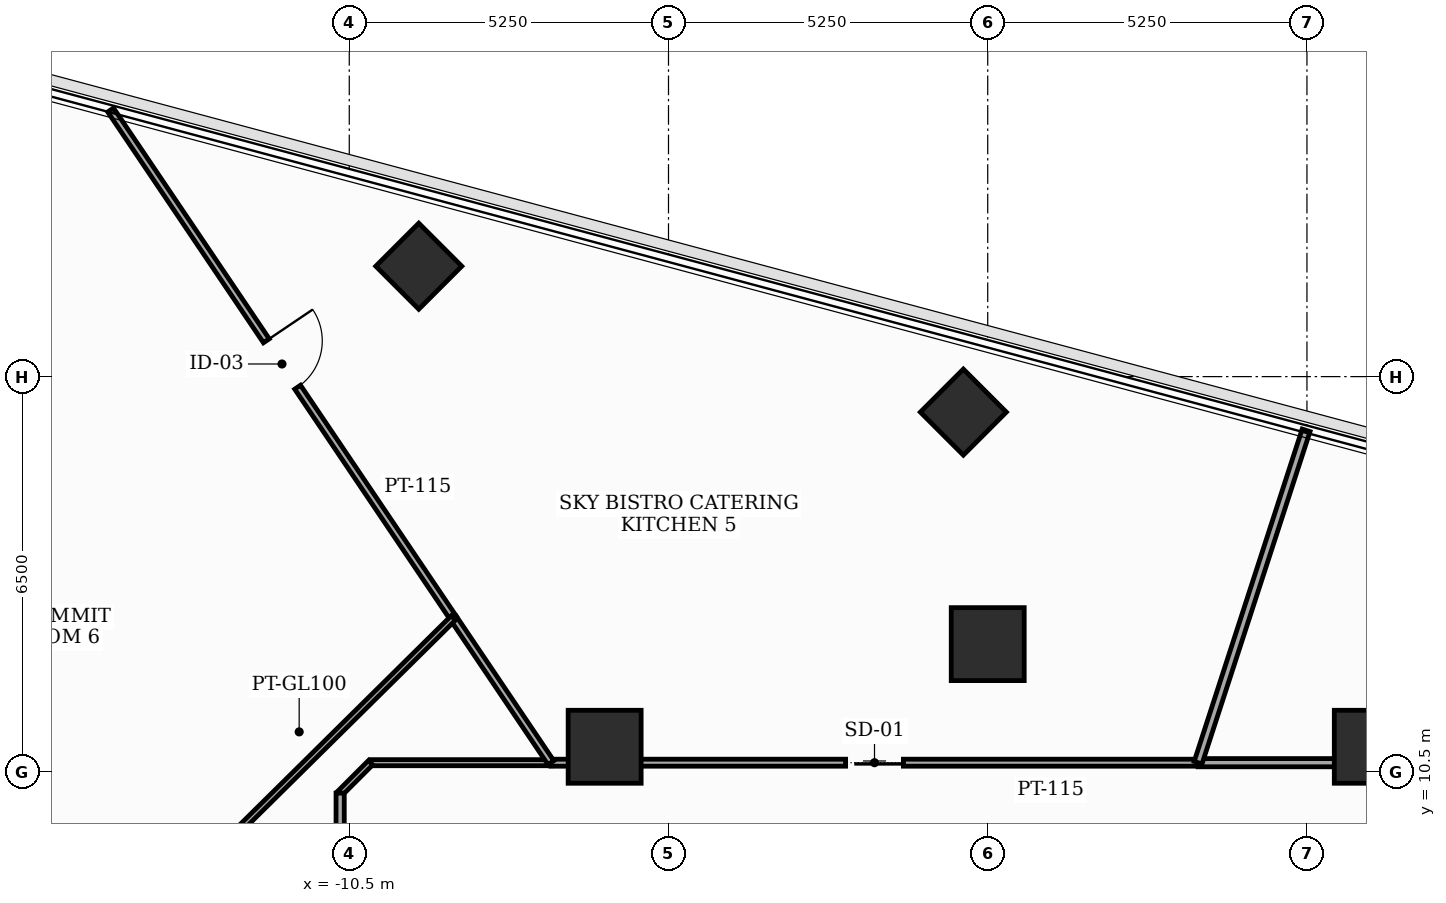
"""IFC4 building model, lengths in metres.
Left out: names, types, materials, properties, quantities, classifications, styles, units other than length and angle.
Written with IfcOpenShell. Run it as: python <this file> out.ifc"""

import sys

from ifc_helpers import new_model, si_unit, direction, frame, frame_2d, origin, origin_2d, place, context, subcontext, project, spatial, rectangle, extrude, element, fill, save


model = new_model("IFC4")
c1 = context("Model", 3, precision=1e-05, world=origin(), true_north=direction((0.0, 1.0)))
c2 = subcontext(c1, "Body", "Model", "MODEL_VIEW")
j1 = project(units=[si_unit("LENGTHUNIT", "METRE"), si_unit("PLANEANGLEUNIT", "RADIAN")], contexts=[c1])
p1 = place(None, origin())
s1 = spatial("IfcSite", under=j1, at=p1, CompositionType="ELEMENT")
p2 = place(p1, origin())
s2 = spatial("IfcBuilding", under=s1, at=p2, CompositionType="ELEMENT")
p3 = place(p2, frame((0.0, 0.0, 210.1)))
s3 = spatial("IfcBuildingStorey", under=s2, at=p3, CompositionType="ELEMENT", Elevation=210.1)
for number, where, z_axis, x_axis in (
    (1, (6.3, 10.912, 0.0), (0.0, 0.0, 1.0), (1.0, 0.0, 0.0)),
    (2, (0.0, 12.6, 0.0), (0.0, 0.0, 1.0), (1.0, 0.0, 0.0)),
    (3, (-6.3, 10.912, 0.0), (0.0, 0.0, 1.0), (1.0, 0.0, 0.0)),
):
    element("IfcColumn", number, at=place(p3, frame(where, z_axis=z_axis, x_axis=x_axis)), inside=s3, PredefinedType="COLUMN", context=c2, shape_type="SweptSolid", body=[
        extrude(rectangle(XDim=1.2, YDim=1.2, at=origin_2d()), origin(), (0.0, 0.0, 1.0), 3.7),
    ])
for number, where, z_axis, x_axis in (
    (4, (-0.401, 16.416, 0.0), (0.0, 0.0, 1.0), (0.707, 0.707, 0.0)),
    (5, (-9.357, 18.816, 0.0), (0.0, 0.0, 1.0), (0.707, 0.707, 0.0)),
):
    element("IfcColumn", number, at=place(p3, frame(where, z_axis=z_axis, x_axis=x_axis)), inside=s3, PredefinedType="COLUMN", context=c2, shape_type="SweptSolid", body=[
        extrude(rectangle(XDim=1.0, YDim=1.0, at=origin_2d()), origin(), (0.0, 0.0, 1.0), 3.7),
    ])
p4 = place(p3, frame((10.15, 10.65, 0.0), z_axis=(0.0, 0.0, 1.0), x_axis=(-1.0, 0.0, 0.0)))
e6 = element("IfcWall", 6, at=p4, inside=s3, PredefinedType="PARTITIONING", context=c2, shape_type="SweptSolid", body=[
    extrude(rectangle(XDim=6.69, YDim=0.135, at=frame_2d((3.345, 0.0))), origin(), (0.0, 0.0, 1.0), 2.045),
])
p5 = place(p4, frame((0.878, 0.0, 0.0)))
e7 = element("IfcOpeningElement", 7, at=p5, cuts=e6, PredefinedType="OPENING", context=c2, shape_type="SweptSolid", body=[
    extrude(rectangle(XDim=0.92, YDim=2.0, at=frame_2d((0.46, 1.0))), frame((0.0, 0.077, 0.0), z_axis=(0.0, -1.0, 0.0), x_axis=(1.0, 0.0, 0.0)), (0.0, 0.0, 1.0), 0.155),
])
p6 = place(p3, frame((3.46, 10.65, 0.0), z_axis=(0.0, 0.0, 1.0), x_axis=(-1.0, 0.0, 0.0)))
e8 = element("IfcWall", 8, at=p6, inside=s3, PredefinedType="PARTITIONING", context=c2, shape_type="SweptSolid", body=[
    extrude(rectangle(XDim=10.644, YDim=0.115, at=frame_2d((5.322, 0.0))), origin(), (0.0, 0.0, 1.0), 2.045),
])
p7 = place(p6, frame((4.847, 0.0, 0.0)))
e9 = element("IfcOpeningElement", 9, at=p7, cuts=e8, PredefinedType="OPENING", context=c2, shape_type="SweptSolid", body=[
    extrude(rectangle(XDim=0.95, YDim=2.0, at=frame_2d((0.475, 1.0))), frame((0.0, 0.067, 0.0), z_axis=(0.0, -1.0, 0.0), x_axis=(1.0, 0.0, 0.0)), (0.0, 0.0, 1.0), 0.135),
])
p8 = place(p3, frame((-7.184, 10.65, 0.0), z_axis=(0.0, 0.0, 1.0), x_axis=(-1.0, 0.0, 0.0)))
e10 = element("IfcWall", 10, at=p8, inside=s3, PredefinedType="MOVABLE", context=c2, shape_type="SweptSolid", body=[
    extrude(rectangle(XDim=2.966, YDim=0.1, at=frame_2d((1.483, 0.0))), origin(), (0.0, 0.0, 1.0), 2.045),
])
p9 = place(p3, frame((-10.15, 10.65, 0.0), z_axis=(0.0, 0.0, 1.0), x_axis=(-0.707106781187, -0.707106781187, 0.0)))
e11 = element("IfcWall", 11, at=p9, inside=s3, PredefinedType="MOVABLE", context=c2, shape_type="SweptSolid", body=[
    extrude(rectangle(XDim=0.707, YDim=0.1, at=frame_2d((0.354, 0.0))), origin(), (0.0, 0.0, 1.0), 3.46),
])
p10 = place(p3, frame((-10.65, 10.15, 0.0), z_axis=(0.0, 0.0, 1.0), x_axis=(0.0, -1.0, 0.0)))
e12 = element("IfcWall", 12, at=p10, inside=s3, PredefinedType="PARTITIONING", context=c2, shape_type="SweptSolid", body=[
    extrude(rectangle(XDim=12.805, YDim=0.135, at=frame_2d((6.402, 0.0))), origin(), (0.0, 0.0, 1.0), 2.845),
])
p11 = place(p10, frame((7.139, 0.0, 0.0)))
e13 = element("IfcOpeningElement", 13, at=p11, cuts=e12, PredefinedType="OPENING", context=c2, shape_type="SweptSolid", body=[
    extrude(rectangle(XDim=1.6, YDim=2.15, at=frame_2d((0.8, 1.075))), frame((0.0, 0.077, 0.0), z_axis=(0.0, -1.0, 0.0), x_axis=(1.0, 0.0, 0.0)), (0.0, 0.0, 1.0), 0.155),
])
p12 = place(p3, frame((5.236, 16.117, 0.0), z_axis=(0.0, 0.0, 1.0), x_axis=(-0.30901980801, -0.951055602085, 0.0)))
e14 = element("IfcWall", 14, at=p12, inside=s3, PredefinedType="PARTITIONING", context=c2, shape_type="SweptSolid", body=[
    extrude(rectangle(XDim=5.748, YDim=0.135, at=frame_2d((2.874, 0.0))), origin(), (0.0, 0.0, 1.0), 2.045),
])
p13 = place(p3, frame((-14.424, 21.385, 0.0), z_axis=(0.0, 0.0, 1.0), x_axis=(0.559175745777, -0.829049145307, 0.0)))
e15 = element("IfcWall", 15, at=p13, inside=s3, PredefinedType="PARTITIONING", context=c2, shape_type="SweptSolid", body=[
    extrude(rectangle(XDim=10.078, YDim=0.115, at=frame_2d((5.039, 0.0))), origin(), (0.0, 0.0, 1.0), 2.045),
])
p14 = place(p13, frame((4.579, 0.0, 0.0)))
e16 = element("IfcOpeningElement", 16, at=p14, cuts=e15, PredefinedType="OPENING", context=c2, shape_type="SweptSolid", body=[
    extrude(rectangle(XDim=0.92, YDim=2.0, at=frame_2d((0.46, 1.0))), frame((0.0, 0.067, 0.0), z_axis=(0.0, -1.0, 0.0), x_axis=(1.0, 0.0, 0.0)), (0.0, 0.0, 1.0), 0.135),
])
p15 = place(p3, frame((-8.789, 13.03, 0.0), z_axis=(0.0, 0.0, 1.0), x_axis=(0.559088648107, -0.829107884149, 0.0)))
e17 = element("IfcWall", 17, at=p15, inside=s3, PredefinedType="PARTITIONING", context=c2, shape_type="SweptSolid", body=[
    extrude(rectangle(XDim=2.871, YDim=0.115, at=frame_2d((1.435, 0.0))), origin(), (0.0, 0.0, 1.0), 2.045),
])
p16 = place(p3, frame((-13.226, 8.644, 0.0), z_axis=(0.0, 0.0, 1.0), x_axis=(0.711184246493, 0.703005666791, 0.0)))
e18 = element("IfcWall", 18, at=p16, inside=s3, PredefinedType="MOVABLE", context=c2, shape_type="SweptSolid", body=[
    extrude(rectangle(XDim=6.239, YDim=0.1, at=frame_2d((3.12, 0.0))), origin(), (0.0, 0.0, 1.0), 2.045),
])
p17 = place(p7, origin())
e19 = element("IfcDoor", 19, at=p17, inside=s3, OperationType="SLIDING_TO_LEFT", PredefinedType="DOOR", context=c2, shape_type="SweptSolid", body=[
    extrude(rectangle(XDim=0.95, YDim=2.0, at=frame_2d((0.475, 1.0))), frame((0.0, 0.025, 0.0), z_axis=(0.0, -1.0, 0.0), x_axis=(1.0, 0.0, 0.0)), (0.0, 0.0, 1.0), 0.05),
])
fill(e9, e19)
p18 = place(p14, origin())
e20 = element("IfcDoor", 20, at=p18, inside=s3, OperationType="SINGLE_SWING_LEFT", PredefinedType="DOOR", context=c2, shape_type="SweptSolid", body=[
    extrude(rectangle(XDim=0.92, YDim=2.0, at=frame_2d((0.46, 1.0))), frame((0.0, 0.025, 0.0), z_axis=(0.0, -1.0, 0.0), x_axis=(1.0, 0.0, 0.0)), (0.0, 0.0, 1.0), 0.05),
])
fill(e16, e20)
save(model, sys.argv[1])
